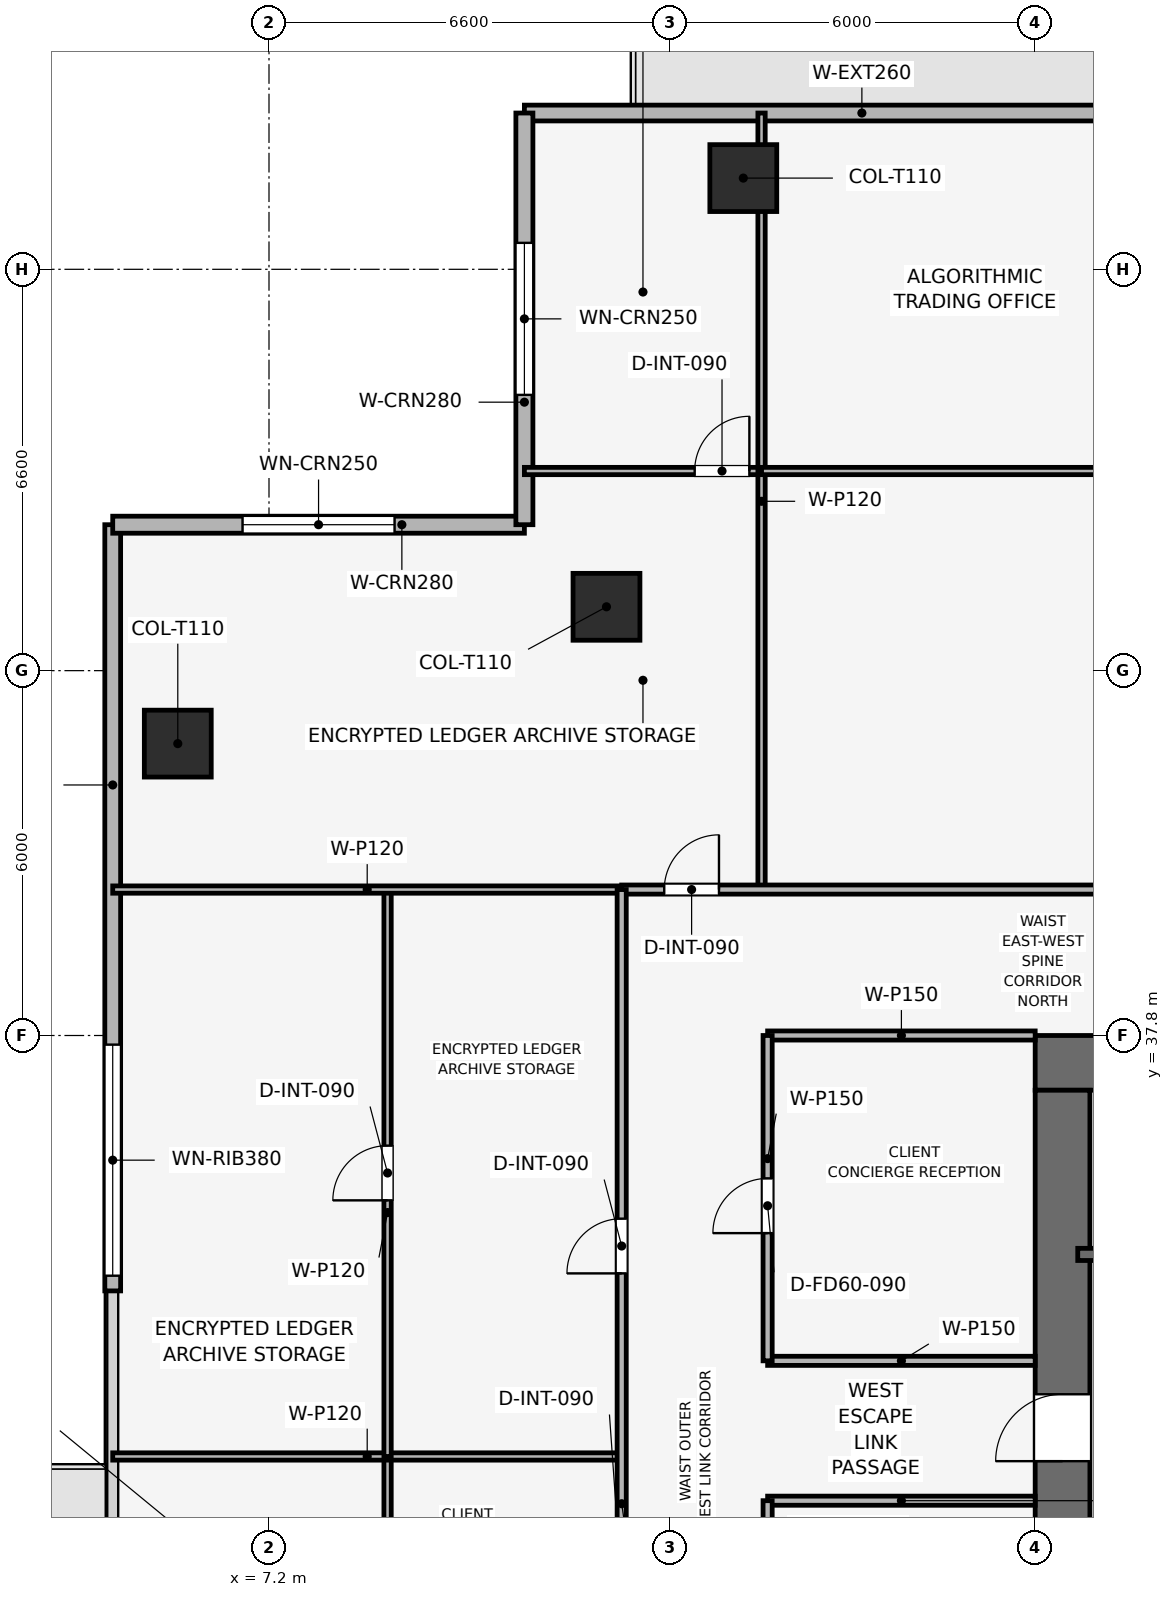
"""IFC4 building model, lengths in metres.
Left out: names, types, materials, properties, quantities, classifications, styles, units other than length and angle.
Written with IfcOpenShell. Run it as: python <this file> out.ifc"""

import sys

from ifc_helpers import new_model, si_unit, direction, frame, frame_2d, origin, origin_2d, place, context, subcontext, project, spatial, rectangle, extrude, element, fill, save


model = new_model("IFC4")
c1 = context("Model", 3, precision=1e-05, world=origin(), true_north=direction((0.0, 1.0)))
c2 = subcontext(c1, "Body", "Model", "MODEL_VIEW")
j1 = project(units=[si_unit("LENGTHUNIT", "METRE"), si_unit("PLANEANGLEUNIT", "RADIAN")], contexts=[c1])
p1 = place(None, origin())
s1 = spatial("IfcSite", under=j1, at=p1, CompositionType="ELEMENT")
p2 = place(p1, origin())
s2 = spatial("IfcBuilding", under=s1, at=p2, CompositionType="ELEMENT")
p3 = place(p2, frame((0.0, 0.0, 153.3)))
s3 = spatial("IfcBuildingStorey", under=s2, at=p3, CompositionType="ELEMENT", Elevation=153.3)
p4 = place(p3, frame((19.8, 37.35, 0.0), z_axis=(0.0, 0.0, 1.0), x_axis=(1.0, 0.0, 0.0)))
e1 = element("IfcWall", 1, at=p4, inside=s3, PredefinedType="SHEAR", context=c2, shape_type="SweptSolid", body=[
    extrude(rectangle(XDim=18.0, YDim=0.9, at=frame_2d((9.0, 0.0))), origin(), (0.0, 0.0, 1.0), 3.75),
])
p5 = place(p4, frame((7.05, 0.0, 0.0)))
e2 = element("IfcOpeningElement", 2, at=p5, cuts=e1, PredefinedType="OPENING", context=c2, shape_type="SweptSolid", body=[
    extrude(rectangle(XDim=1.1, YDim=2.15, at=frame_2d((0.55, 1.075))), frame((0.0, 0.46, 0.0), z_axis=(0.0, -1.0, 0.0), x_axis=(1.0, 0.0, 0.0)), (0.0, 0.0, 1.0), 0.92),
])
p6 = place(p3, frame((20.25, 20.7, 0.0), z_axis=(0.0, 0.0, 1.0), x_axis=(0.0, 1.0, 0.0)))
e3 = element("IfcWall", 3, at=p6, inside=s3, PredefinedType="SHEAR", context=c2, shape_type="SweptSolid", body=[
    extrude(rectangle(XDim=16.2, YDim=0.9, at=frame_2d((8.1, 0.0))), origin(), (0.0, 0.0, 1.0), 3.75),
])
p7 = place(p6, frame((10.1, 0.0, 0.0)))
e4 = element("IfcOpeningElement", 4, at=p7, cuts=e3, PredefinedType="OPENING", context=c2, shape_type="SweptSolid", body=[
    extrude(rectangle(XDim=1.1, YDim=2.15, at=frame_2d((0.55, 1.075))), frame((0.0, 0.46, 0.0), z_axis=(0.0, -1.0, 0.0), x_axis=(1.0, 0.0, 0.0)), (0.0, 0.0, 1.0), 0.92),
])
for number, where, z_axis, x_axis in (
    (5, (15.0, 51.9, 0.003), (0.0, 0.0, 1.0), (1.0, 0.0, 0.0)),
    (6, (5.7, 42.6, 0.003), (0.0, 0.0, 1.0), (1.0, 0.0, 0.0)),
    (7, (12.75, 44.85, 0.003), (0.0, 0.0, 1.0), (1.0, 0.0, 0.0)),
):
    element("IfcColumn", number, at=place(p3, frame(where, z_axis=z_axis, x_axis=x_axis)), inside=s3, PredefinedType="COLUMN", context=c2, shape_type="SweptSolid", body=[
        extrude(rectangle(XDim=1.1, YDim=1.1, at=origin_2d()), origin(), (0.0, 0.0, 1.0), 3.489),
    ])
p8 = place(p3, frame((11.4, 52.97, 0.0), z_axis=(0.0, 0.0, 1.0), x_axis=(1.0, 0.0, 0.0)))
e8 = element("IfcWall", 8, at=p8, inside=s3, PredefinedType="SOLIDWALL", context=c2, shape_type="SweptSolid", body=[
    extrude(rectangle(XDim=12.6, YDim=0.26, at=frame_2d((6.3, 0.0))), origin(), (0.0, 0.0, 1.0), 3.495),
])
p9 = place(p8, frame((11.25, 0.0, 0.0)))
e9 = element("IfcOpeningElement", 9, at=p9, cuts=e8, PredefinedType="OPENING", context=c2, shape_type="SweptSolid", body=[
    extrude(rectangle(XDim=1.1, YDim=2.2, at=frame_2d((0.55, 1.1))), frame((0.0, 0.14, 0.0), z_axis=(0.0, -1.0, 0.0), x_axis=(1.0, 0.0, 0.0)), (0.0, 0.0, 1.0), 0.28),
])
p10 = place(p3, frame((4.63, 33.6, 0.0), z_axis=(0.0, 0.0, 1.0), x_axis=(0.0, 1.0, 0.0)))
e10 = element("IfcWall", 10, at=p10, inside=s3, PredefinedType="SOLIDWALL", context=c2, shape_type="SweptSolid", body=[
    extrude(rectangle(XDim=12.6, YDim=0.26, at=frame_2d((6.3, 0.0))), origin(), (0.0, 0.0, 1.0), 3.495),
])
p11 = place(p10, frame((0.25, 0.0, 0.9)))
e11 = element("IfcOpeningElement", 11, at=p11, cuts=e10, PredefinedType="OPENING", context=c2, shape_type="SweptSolid", body=[
    extrude(rectangle(XDim=3.8, YDim=1.9, at=frame_2d((1.9, 0.95))), frame((0.0, 0.14, 0.0), z_axis=(0.0, -1.0, 0.0), x_axis=(1.0, 0.0, 0.0)), (0.0, 0.0, 1.0), 0.28),
])
p12 = place(p3, frame((4.63, 46.2, 0.0), z_axis=(0.0, 0.0, 1.0), x_axis=(1.0, 0.0, 0.0)))
e12 = element("IfcWall", 12, at=p12, inside=s3, PredefinedType="SOLIDWALL", context=c2, shape_type="SweptSolid", body=[
    extrude(rectangle(XDim=6.77, YDim=0.28, at=frame_2d((3.385, 0.0))), origin(), (0.0, 0.0, 1.0), 3.495),
])
p13 = place(p12, frame((2.135, 0.0, 0.9)))
e13 = element("IfcOpeningElement", 13, at=p13, cuts=e12, PredefinedType="OPENING", context=c2, shape_type="SweptSolid", body=[
    extrude(rectangle(XDim=2.5, YDim=1.9, at=frame_2d((1.25, 0.95))), frame((0.0, 0.15, 0.0), z_axis=(0.0, -1.0, 0.0), x_axis=(1.0, 0.0, 0.0)), (0.0, 0.0, 1.0), 0.3),
])
p14 = place(p3, frame((11.4, 46.2, 0.0), z_axis=(0.0, 0.0, 1.0), x_axis=(0.0, 1.0, 0.0)))
e14 = element("IfcWall", 14, at=p14, inside=s3, PredefinedType="SOLIDWALL", context=c2, shape_type="SweptSolid", body=[
    extrude(rectangle(XDim=6.77, YDim=0.28, at=frame_2d((3.385, 0.0))), origin(), (0.0, 0.0, 1.0), 3.495),
])
p15 = place(p14, frame((2.135, 0.0, 0.9)))
e15 = element("IfcOpeningElement", 15, at=p15, cuts=e14, PredefinedType="OPENING", context=c2, shape_type="SweptSolid", body=[
    extrude(rectangle(XDim=2.5, YDim=1.9, at=frame_2d((1.25, 0.95))), frame((0.0, 0.15, 0.0), z_axis=(0.0, -1.0, 0.0), x_axis=(1.0, 0.0, 0.0)), (0.0, 0.0, 1.0), 0.3),
])
p16 = place(p3, frame((20.5, 34.2, 0.0), z_axis=(0.0, 0.0, 1.0), x_axis=(1.0, 0.0, 0.0)))
e16 = element("IfcWall", 16, at=p16, inside=s3, PredefinedType="SHEAR", context=c2, shape_type="SweptSolid", body=[
    extrude(rectangle(XDim=3.05, YDim=0.2, at=frame_2d((1.525, 0.0))), origin(), (0.0, 0.0, 1.0), 3.495),
])
p17 = place(p16, frame((0.75, 0.0, 0.0)))
e17 = element("IfcOpeningElement", 17, at=p17, cuts=e16, PredefinedType="OPENING", context=c2, shape_type="SweptSolid", body=[
    extrude(rectangle(XDim=1.1, YDim=2.15, at=frame_2d((0.55, 1.075))), frame((0.0, 0.11, 0.0), z_axis=(0.0, -1.0, 0.0), x_axis=(1.0, 0.0, 0.0)), (0.0, 0.0, 1.0), 0.22),
])
for number, where, z_axis, x_axis in (
    (18, (15.4, 30.15, 0.0), (0.0, 0.0, 1.0), (1.0, 0.0, 0.0)),
    (19, (15.4, 32.45, 0.0), (0.0, 0.0, 1.0), (1.0, 0.0, 0.0)),
):
    element("IfcWall", number, at=place(p3, frame(where, z_axis=z_axis, x_axis=x_axis)), inside=s3, PredefinedType="PARTITIONING", context=c2, shape_type="SweptSolid", body=[
        extrude(rectangle(XDim=4.4, YDim=0.15, at=frame_2d((2.2, 0.0))), origin(), (0.0, 0.0, 1.0), 3.495),
    ])
p18 = place(p3, frame((15.4, 37.8, 0.0), z_axis=(0.0, 0.0, 1.0), x_axis=(1.0, 0.0, 0.0)))
e20 = element("IfcWall", 20, at=p18, inside=s3, PredefinedType="PARTITIONING", context=c2, shape_type="SweptSolid", body=[
    extrude(rectangle(XDim=4.4, YDim=0.15, at=frame_2d((2.2, 0.0))), origin(), (0.0, 0.0, 1.0), 3.03),
])
p19 = place(p3, frame((15.4, 19.8, 0.0), z_axis=(0.0, 0.0, 1.0), x_axis=(0.0, 1.0, 0.0)))
e21 = element("IfcWall", 21, at=p19, inside=s3, PredefinedType="PARTITIONING", context=c2, shape_type="SweptSolid", body=[
    extrude(rectangle(XDim=10.35, YDim=0.15, at=frame_2d((5.175, 0.0))), origin(), (0.0, 0.0, 1.0), 3.03),
])
p20 = place(p19, frame((1.2, 0.0, 0.0)))
e22 = element("IfcOpeningElement", 22, at=p20, cuts=e21, PredefinedType="OPENING", context=c2, shape_type="SweptSolid", body=[
    extrude(rectangle(XDim=0.9, YDim=2.1, at=frame_2d((0.45, 1.05))), frame((0.0, 0.085, 0.0), z_axis=(0.0, -1.0, 0.0), x_axis=(1.0, 0.0, 0.0)), (0.0, 0.0, 1.0), 0.17),
])
p21 = place(p19, frame((4.7, 0.0, 0.0)))
e23 = element("IfcOpeningElement", 23, at=p21, cuts=e21, PredefinedType="OPENING", context=c2, shape_type="SweptSolid", body=[
    extrude(rectangle(XDim=0.9, YDim=2.1, at=frame_2d((0.45, 1.05))), frame((0.0, 0.085, 0.0), z_axis=(0.0, -1.0, 0.0), x_axis=(1.0, 0.0, 0.0)), (0.0, 0.0, 1.0), 0.17),
])
p22 = place(p19, frame((8.1, 0.0, 0.0)))
e24 = element("IfcOpeningElement", 24, at=p22, cuts=e21, PredefinedType="OPENING", context=c2, shape_type="SweptSolid", body=[
    extrude(rectangle(XDim=0.95, YDim=2.1, at=frame_2d((0.475, 1.05))), frame((0.0, 0.085, 0.0), z_axis=(0.0, -1.0, 0.0), x_axis=(1.0, 0.0, 0.0)), (0.0, 0.0, 1.0), 0.17),
])
p23 = place(p3, frame((15.4, 32.45, 0.0), z_axis=(0.0, 0.0, 1.0), x_axis=(0.0, 1.0, 0.0)))
e25 = element("IfcWall", 25, at=p23, inside=s3, PredefinedType="PARTITIONING", context=c2, shape_type="SweptSolid", body=[
    extrude(rectangle(XDim=5.35, YDim=0.15, at=frame_2d((2.675, 0.0))), origin(), (0.0, 0.0, 1.0), 3.03),
])
p24 = place(p23, frame((2.1, 0.0, 0.0)))
e26 = element("IfcOpeningElement", 26, at=p24, cuts=e25, PredefinedType="OPENING", context=c2, shape_type="SweptSolid", body=[
    extrude(rectangle(XDim=0.9, YDim=2.1, at=frame_2d((0.45, 1.05))), frame((0.0, 0.085, 0.0), z_axis=(0.0, -1.0, 0.0), x_axis=(1.0, 0.0, 0.0)), (0.0, 0.0, 1.0), 0.17),
])
p25 = place(p3, frame((11.4, 47.083, 0.0), z_axis=(0.0, 0.0, 1.0), x_axis=(1.0, 0.0, 0.0)))
e27 = element("IfcWall", 27, at=p25, inside=s3, PredefinedType="PARTITIONING", context=c2, shape_type="SweptSolid", body=[
    extrude(rectangle(XDim=3.9, YDim=0.12, at=frame_2d((1.95, 0.0))), origin(), (0.0, 0.0, 1.0), 2.98),
])
p26 = place(p25, frame((2.8, 0.0, 0.0)))
e28 = element("IfcOpeningElement", 28, at=p26, cuts=e27, PredefinedType="OPENING", context=c2, shape_type="SweptSolid", body=[
    extrude(rectangle(XDim=0.9, YDim=2.1, at=frame_2d((0.45, 1.05))), frame((0.0, 0.07, 0.0), z_axis=(0.0, -1.0, 0.0), x_axis=(1.0, 0.0, 0.0)), (0.0, 0.0, 1.0), 0.14),
])
p27 = place(p3, frame((15.3, 40.2, 0.0), z_axis=(0.0, 0.0, 1.0), x_axis=(0.0, 1.0, 0.0)))
e29 = element("IfcWall", 29, at=p27, inside=s3, PredefinedType="PARTITIONING", context=c2, shape_type="SweptSolid", body=[
    extrude(rectangle(XDim=12.77, YDim=0.12, at=frame_2d((6.385, 0.0))), origin(), (0.0, 0.0, 1.0), 2.98),
])
p28 = place(p3, frame((15.3, 47.083, 0.0), z_axis=(0.0, 0.0, 1.0), x_axis=(1.0, 0.0, 0.0)))
e30 = element("IfcWall", 30, at=p28, inside=s3, PredefinedType="PARTITIONING", context=c2, shape_type="SweptSolid", body=[
    extrude(rectangle(XDim=13.331, YDim=0.12, at=frame_2d((6.666, 0.0))), origin(), (0.0, 0.0, 1.0), 3.03),
])
p29 = place(p28, frame((6.216, 0.0, 0.0)))
e31 = element("IfcOpeningElement", 31, at=p29, cuts=e30, PredefinedType="OPENING", context=c2, shape_type="SweptSolid", body=[
    extrude(rectangle(XDim=0.9, YDim=2.1, at=frame_2d((0.45, 1.05))), frame((0.0, 0.07, 0.0), z_axis=(0.0, -1.0, 0.0), x_axis=(1.0, 0.0, 0.0)), (0.0, 0.0, 1.0), 0.14),
])
p30 = place(p3, frame((9.15, 26.58, 0.0), z_axis=(0.0, 0.0, 1.0), x_axis=(0.0, 1.0, 0.0)))
e32 = element("IfcWall", 32, at=p30, inside=s3, PredefinedType="PARTITIONING", context=c2, shape_type="SweptSolid", body=[
    extrude(rectangle(XDim=4.297, YDim=0.12, at=frame_2d((2.148, 0.0))), origin(), (0.0, 0.0, 1.0), 3.03),
])
p31 = place(p30, frame((0.2, 0.0, 0.0)))
e33 = element("IfcOpeningElement", 33, at=p31, cuts=e32, PredefinedType="OPENING", context=c2, shape_type="SweptSolid", body=[
    extrude(rectangle(XDim=0.9, YDim=2.1, at=frame_2d((0.45, 1.05))), frame((0.0, 0.07, 0.0), z_axis=(0.0, -1.0, 0.0), x_axis=(1.0, 0.0, 0.0)), (0.0, 0.0, 1.0), 0.14),
])
p32 = place(p3, frame((4.63, 30.877, 0.0), z_axis=(0.0, 0.0, 1.0), x_axis=(1.0, 0.0, 0.0)))
e34 = element("IfcWall", 34, at=p32, inside=s3, PredefinedType="PARTITIONING", context=c2, shape_type="SweptSolid", body=[
    extrude(rectangle(XDim=8.37, YDim=0.12, at=frame_2d((4.185, 0.0))), origin(), (0.0, 0.0, 1.0), 2.98),
])
p33 = place(p3, frame((9.15, 30.877, 0.0), z_axis=(0.0, 0.0, 1.0), x_axis=(0.0, 1.0, 0.0)))
e35 = element("IfcWall", 35, at=p33, inside=s3, PredefinedType="PARTITIONING", context=c2, shape_type="SweptSolid", body=[
    extrude(rectangle(XDim=9.323, YDim=0.12, at=frame_2d((4.662, 0.0))), origin(), (0.0, 0.0, 1.0), 3.03),
])
p34 = place(p33, frame((4.212, 0.0, 0.0)))
e36 = element("IfcOpeningElement", 36, at=p34, cuts=e35, PredefinedType="OPENING", context=c2, shape_type="SweptSolid", body=[
    extrude(rectangle(XDim=0.9, YDim=2.1, at=frame_2d((0.45, 1.05))), frame((0.0, 0.07, 0.0), z_axis=(0.0, -1.0, 0.0), x_axis=(1.0, 0.0, 0.0)), (0.0, 0.0, 1.0), 0.14),
])
p35 = place(p3, frame((4.63, 40.2, 0.0), z_axis=(0.0, 0.0, 1.0), x_axis=(1.0, 0.0, 0.0)))
e37 = element("IfcWall", 37, at=p35, inside=s3, PredefinedType="PARTITIONING", context=c2, shape_type="SweptSolid", body=[
    extrude(rectangle(XDim=8.37, YDim=0.12, at=frame_2d((4.185, 0.0))), origin(), (0.0, 0.0, 1.0), 2.98),
])
p36 = place(p3, frame((13.0, 40.2, 0.0), z_axis=(0.0, 0.0, 1.0), x_axis=(1.0, 0.0, 0.0)))
e38 = element("IfcWall", 38, at=p36, inside=s3, PredefinedType="PARTITIONING", context=c2, shape_type="SweptSolid", body=[
    extrude(rectangle(XDim=31.6, YDim=0.15, at=frame_2d((15.8, 0.0))), origin(), (0.0, 0.0, 1.0), 3.03),
])
p37 = place(p36, frame((0.7, 0.0, 0.0)))
e39 = element("IfcOpeningElement", 39, at=p37, cuts=e38, PredefinedType="OPENING", context=c2, shape_type="SweptSolid", body=[
    extrude(rectangle(XDim=0.9, YDim=2.1, at=frame_2d((0.45, 1.05))), frame((0.0, 0.085, 0.0), z_axis=(0.0, -1.0, 0.0), x_axis=(1.0, 0.0, 0.0)), (0.0, 0.0, 1.0), 0.17),
])
p38 = place(p36, frame((8.515, 0.0, 0.0)))
e40 = element("IfcOpeningElement", 40, at=p38, cuts=e38, PredefinedType="OPENING", context=c2, shape_type="SweptSolid", body=[
    extrude(rectangle(XDim=0.9, YDim=2.1, at=frame_2d((0.45, 1.05))), frame((0.0, 0.085, 0.0), z_axis=(0.0, -1.0, 0.0), x_axis=(1.0, 0.0, 0.0)), (0.0, 0.0, 1.0), 0.17),
])
p39 = place(p36, frame((23.165, 0.0, 0.0)))
e41 = element("IfcOpeningElement", 41, at=p39, cuts=e38, PredefinedType="OPENING", context=c2, shape_type="SweptSolid", body=[
    extrude(rectangle(XDim=0.9, YDim=2.1, at=frame_2d((0.45, 1.05))), frame((0.0, 0.085, 0.0), z_axis=(0.0, -1.0, 0.0), x_axis=(1.0, 0.0, 0.0)), (0.0, 0.0, 1.0), 0.17),
])
p40 = place(p3, frame((13.0, 17.4, 0.0), z_axis=(0.0, 0.0, 1.0), x_axis=(0.0, 1.0, 0.0)))
e42 = element("IfcWall", 42, at=p40, inside=s3, PredefinedType="PARTITIONING", context=c2, shape_type="SweptSolid", body=[
    extrude(rectangle(XDim=22.8, YDim=0.15, at=frame_2d((11.4, 0.0))), origin(), (0.0, 0.0, 1.0), 3.03),
])
p41 = place(p40, frame((3.191, 0.0, 0.0)))
e43 = element("IfcOpeningElement", 43, at=p41, cuts=e42, PredefinedType="OPENING", context=c2, shape_type="SweptSolid", body=[
    extrude(rectangle(XDim=0.9, YDim=2.1, at=frame_2d((0.45, 1.05))), frame((0.0, 0.085, 0.0), z_axis=(0.0, -1.0, 0.0), x_axis=(1.0, 0.0, 0.0)), (0.0, 0.0, 1.0), 0.17),
])
p42 = place(p40, frame((6.581, 0.0, 0.0)))
e44 = element("IfcOpeningElement", 44, at=p42, cuts=e42, PredefinedType="OPENING", context=c2, shape_type="SweptSolid", body=[
    extrude(rectangle(XDim=0.9, YDim=2.1, at=frame_2d((0.45, 1.05))), frame((0.0, 0.085, 0.0), z_axis=(0.0, -1.0, 0.0), x_axis=(1.0, 0.0, 0.0)), (0.0, 0.0, 1.0), 0.17),
])
p43 = place(p40, frame((10.878, 0.0, 0.0)))
e45 = element("IfcOpeningElement", 45, at=p43, cuts=e42, PredefinedType="OPENING", context=c2, shape_type="SweptSolid", body=[
    extrude(rectangle(XDim=0.9, YDim=2.1, at=frame_2d((0.45, 1.05))), frame((0.0, 0.085, 0.0), z_axis=(0.0, -1.0, 0.0), x_axis=(1.0, 0.0, 0.0)), (0.0, 0.0, 1.0), 0.17),
])
p44 = place(p40, frame((16.488, 0.0, 0.0)))
e46 = element("IfcOpeningElement", 46, at=p44, cuts=e42, PredefinedType="OPENING", context=c2, shape_type="SweptSolid", body=[
    extrude(rectangle(XDim=0.9, YDim=2.1, at=frame_2d((0.45, 1.05))), frame((0.0, 0.085, 0.0), z_axis=(0.0, -1.0, 0.0), x_axis=(1.0, 0.0, 0.0)), (0.0, 0.0, 1.0), 0.17),
])
p45 = place(p11, origin())
e47 = element("IfcWindow", 47, at=p45, inside=s3, PartitioningType="SINGLE_PANEL", PredefinedType="WINDOW", context=c2, shape_type="SweptSolid", body=[
    extrude(rectangle(XDim=3.8, YDim=1.9, at=frame_2d((1.9, 0.95))), frame((0.0, 0.03, 0.0), z_axis=(0.0, -1.0, 0.0), x_axis=(1.0, 0.0, 0.0)), (0.0, 0.0, 1.0), 0.06),
])
fill(e11, e47)
p46 = place(p13, origin())
e48 = element("IfcWindow", 48, at=p46, inside=s3, PartitioningType="SINGLE_PANEL", PredefinedType="WINDOW", context=c2, shape_type="SweptSolid", body=[
    extrude(rectangle(XDim=2.5, YDim=1.9, at=frame_2d((1.25, 0.95))), frame((0.0, 0.03, 0.0), z_axis=(0.0, -1.0, 0.0), x_axis=(1.0, 0.0, 0.0)), (0.0, 0.0, 1.0), 0.06),
])
fill(e13, e48)
p47 = place(p15, origin())
e49 = element("IfcWindow", 49, at=p47, inside=s3, PartitioningType="SINGLE_PANEL", PredefinedType="WINDOW", context=c2, shape_type="SweptSolid", body=[
    extrude(rectangle(XDim=2.5, YDim=1.9, at=frame_2d((1.25, 0.95))), frame((0.0, 0.03, 0.0), z_axis=(0.0, -1.0, 0.0), x_axis=(1.0, 0.0, 0.0)), (0.0, 0.0, 1.0), 0.06),
])
fill(e15, e49)
p48 = place(p24, origin())
e50 = element("IfcDoor", 50, at=p48, inside=s3, OperationType="SINGLE_SWING_LEFT", PredefinedType="DOOR", context=c2, shape_type="SweptSolid", body=[
    extrude(rectangle(XDim=0.9, YDim=2.1, at=frame_2d((0.45, 1.05))), frame((0.0, 0.025, 0.0), z_axis=(0.0, -1.0, 0.0), x_axis=(1.0, 0.0, 0.0)), (0.0, 0.0, 1.0), 0.05),
])
fill(e26, e50)
p49 = place(p26, origin())
e51 = element("IfcDoor", 51, at=p49, inside=s3, OperationType="SINGLE_SWING_RIGHT", PredefinedType="DOOR", context=c2, shape_type="SweptSolid", body=[
    extrude(rectangle(XDim=0.9, YDim=2.1, at=frame_2d((0.45, 1.05))), frame((0.0, 0.025, 0.0), z_axis=(0.0, -1.0, 0.0), x_axis=(1.0, 0.0, 0.0)), (0.0, 0.0, 1.0), 0.05),
])
fill(e28, e51)
p50 = place(p34, origin())
e52 = element("IfcDoor", 52, at=p50, inside=s3, OperationType="SINGLE_SWING_LEFT", PredefinedType="DOOR", context=c2, shape_type="SweptSolid", body=[
    extrude(rectangle(XDim=0.9, YDim=2.1, at=frame_2d((0.45, 1.05))), frame((0.0, 0.025, 0.0), z_axis=(0.0, -1.0, 0.0), x_axis=(1.0, 0.0, 0.0)), (0.0, 0.0, 1.0), 0.05),
])
fill(e36, e52)
p51 = place(p37, origin())
e53 = element("IfcDoor", 53, at=p51, inside=s3, OperationType="SINGLE_SWING_RIGHT", PredefinedType="DOOR", context=c2, shape_type="SweptSolid", body=[
    extrude(rectangle(XDim=0.9, YDim=2.1, at=frame_2d((0.45, 1.05))), frame((0.0, 0.025, 0.0), z_axis=(0.0, -1.0, 0.0), x_axis=(1.0, 0.0, 0.0)), (0.0, 0.0, 1.0), 0.05),
])
fill(e39, e53)
p52 = place(p44, origin())
e54 = element("IfcDoor", 54, at=p52, inside=s3, OperationType="SINGLE_SWING_LEFT", PredefinedType="DOOR", context=c2, shape_type="SweptSolid", body=[
    extrude(rectangle(XDim=0.9, YDim=2.1, at=frame_2d((0.45, 1.05))), frame((0.0, 0.025, 0.0), z_axis=(0.0, -1.0, 0.0), x_axis=(1.0, 0.0, 0.0)), (0.0, 0.0, 1.0), 0.05),
])
fill(e46, e54)
p53 = place(p7, origin())
e55 = element("IfcDoor", 55, at=p53, inside=s3, OperationType="SINGLE_SWING_LEFT", PredefinedType="DOOR", context=c2, shape_type="SweptSolid", body=[
    extrude(rectangle(XDim=1.1, YDim=2.15, at=frame_2d((0.55, 1.075))), frame((0.0, 0.025, 0.0), z_axis=(0.0, -1.0, 0.0), x_axis=(1.0, 0.0, 0.0)), (0.0, 0.0, 1.0), 0.05),
])
fill(e4, e55)
save(model, sys.argv[1])
